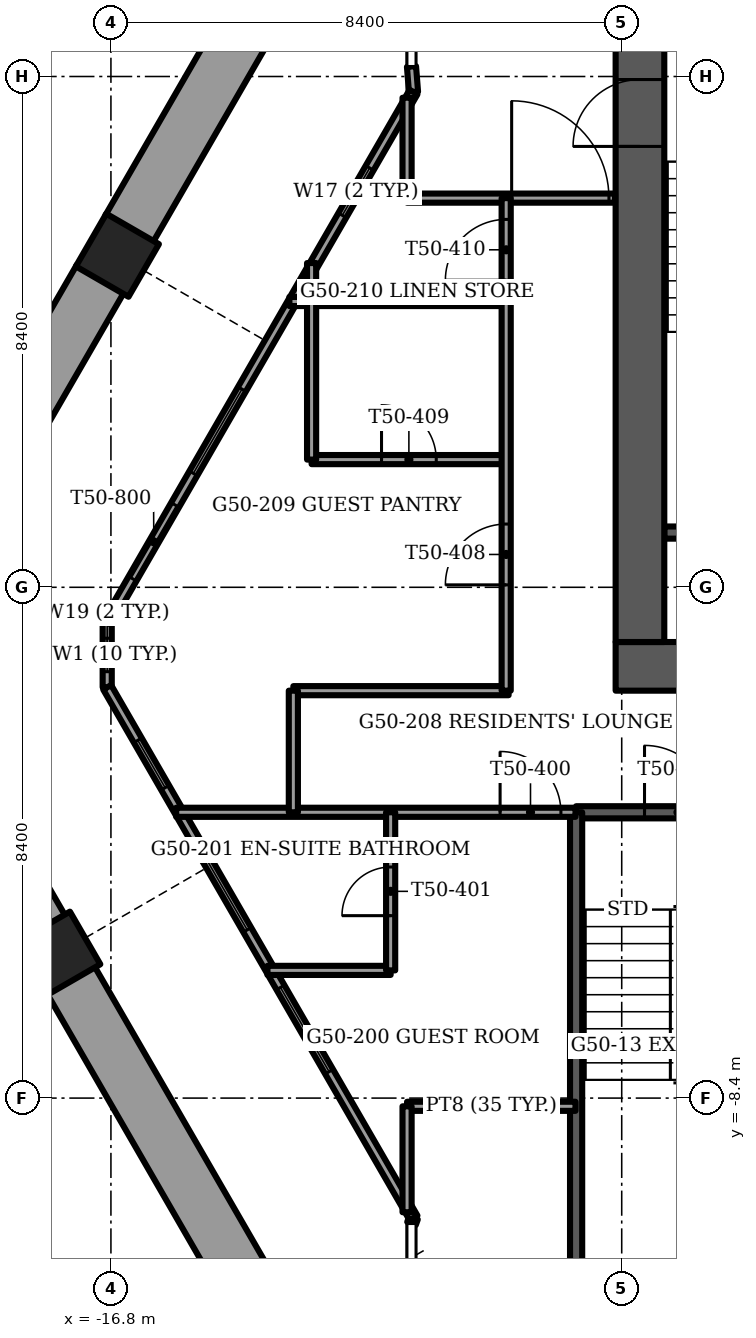
"""IFC4 building model, lengths in metres.
Left out: names, types, materials, properties, quantities, classifications, styles, units other than length and angle.
Written with IfcOpenShell. Run it as: python <this file> out.ifc"""

import sys

from ifc_helpers import new_model, si_unit, direction, frame, frame_2d, origin, origin_2d, place, context, subcontext, project, spatial, rectangle, extrude, element, fill, save


model = new_model("IFC4")
c1 = context("Model", 3, precision=1e-05, world=origin(), true_north=direction((0.0, 1.0)))
c2 = subcontext(c1, "Body", "Model", "MODEL_VIEW")
j1 = project(units=[si_unit("LENGTHUNIT", "METRE"), si_unit("PLANEANGLEUNIT", "RADIAN")], contexts=[c1])
p1 = place(None, origin())
s1 = spatial("IfcSite", under=j1, at=p1, CompositionType="ELEMENT")
p2 = place(p1, origin())
s2 = spatial("IfcBuilding", under=s1, at=p2, CompositionType="ELEMENT")
p3 = place(p2, frame((0.0, 0.0, 202.0)))
s3 = spatial("IfcBuildingStorey", under=s2, at=p3, CompositionType="ELEMENT", Elevation=202.0)
for number, where, z_axis, x_axis in (
    (1, (-16.694, 5.46, -1.2), (0.0, 0.0, 1.0), (0.5, 0.866, 0.0)),
    (2, (-17.657, -6.017, -1.2), (0.0, 0.0, 1.0), (-0.5, 0.866, 0.0)),
):
    element("IfcColumn", number, at=place(p3, frame(where, z_axis=z_axis, x_axis=x_axis)), inside=s3, PredefinedType="COLUMN", context=c2, shape_type="SweptSolid", body=[
        extrude(rectangle(XDim=1.0, YDim=1.0, at=origin_2d()), origin(), (0.0, 0.0, 1.0), 3.75),
    ])
p4 = place(p3, frame((-8.5, -1.3, -0.3), z_axis=(0.0, 0.0, 1.0), x_axis=(1.0, 0.0, 0.0)))
e3 = element("IfcWall", 3, at=p4, inside=s3, PredefinedType="SHEAR", context=c2, shape_type="SweptSolid", body=[
    extrude(rectangle(XDim=17.0, YDim=0.8, at=frame_2d((8.5, 0.0))), origin(), (0.0, 0.0, 1.0), 3.75),
])
p5 = place(p4, frame((7.7, 0.0, 0.0)))
e4 = element("IfcOpeningElement", 4, at=p5, cuts=e3, PredefinedType="OPENING", context=c2, shape_type="SweptSolid", body=[
    extrude(rectangle(XDim=1.6, YDim=2.1, at=frame_2d((0.8, 1.05))), frame((0.0, 0.4, 0.0), z_axis=(0.0, -1.0, 0.0), x_axis=(1.0, 0.0, 0.0)), (0.0, 0.0, 1.0), 0.8),
])
p6 = place(p3, frame((-8.1, -0.9, -0.3), z_axis=(0.0, 0.0, 1.0), x_axis=(0.0, 1.0, 0.0)))
e5 = element("IfcWall", 5, at=p6, inside=s3, PredefinedType="SHEAR", context=c2, shape_type="SweptSolid", body=[
    extrude(rectangle(XDim=9.8, YDim=0.8, at=frame_2d((4.9, 0.0))), origin(), (0.0, 0.0, 1.0), 3.75),
])
p7 = place(p6, frame((8.15, 0.0, 0.0)))
e6 = element("IfcOpeningElement", 6, at=p7, cuts=e5, PredefinedType="OPENING", context=c2, shape_type="SweptSolid", body=[
    extrude(rectangle(XDim=1.1, YDim=2.1, at=frame_2d((0.55, 1.05))), frame((0.0, 0.4, 0.0), z_axis=(0.0, -1.0, 0.0), x_axis=(1.0, 0.0, 0.0)), (0.0, 0.0, 1.0), 0.8),
])
p8 = place(p3, frame((-13.354, 11.345, 0.0), z_axis=(0.0, 0.0, 1.0), x_axis=(-0.500013351051, -0.866017695414, 0.0)))
e7 = element("IfcWall", 7, at=p8, inside=s3, PredefinedType="PARAPET", context=c2, shape_type="SweptSolid", body=[
    extrude(rectangle(XDim=6.296, YDim=0.9, at=frame_2d((3.148, 0.0))), origin(), (0.0, 0.0, 1.0), 1.1),
])
p9 = place(p3, frame((-16.972, 5.078, 0.0), z_axis=(0.0, 0.0, 1.0), x_axis=(-0.500010360262, -0.866019422202, 0.0)))
e8 = element("IfcWall", 8, at=p9, inside=s3, PredefinedType="PARAPET", context=c2, shape_type="SweptSolid", body=[
    extrude(rectangle(XDim=6.606, YDim=0.9, at=frame_2d((3.303, 0.0))), origin(), (0.0, 0.0, 1.0), 1.1),
])
p10 = place(p3, frame((-20.275, -1.583, 0.0), z_axis=(0.0, 0.0, 1.0), x_axis=(0.500028081597, -0.86600919026, 0.0)))
e9 = element("IfcWall", 9, at=p10, inside=s3, PredefinedType="PARAPET", context=c2, shape_type="SweptSolid", body=[
    extrude(rectangle(XDim=4.679, YDim=0.9, at=frame_2d((2.339, 0.0))), origin(), (0.0, 0.0, 1.0), 1.1),
])
p11 = place(p3, frame((-17.466, -6.449, 0.0), z_axis=(0.0, 0.0, 1.0), x_axis=(0.500013351051, -0.866017695414, 0.0)))
e10 = element("IfcWall", 10, at=p11, inside=s3, PredefinedType="PARAPET", context=c2, shape_type="SweptSolid", body=[
    extrude(rectangle(XDim=6.296, YDim=0.9, at=frame_2d((3.148, 0.0))), origin(), (0.0, 0.0, 1.0), 1.1),
])
p12 = place(p3, frame((-11.824, 8.145, 0.0), z_axis=(0.0, 0.0, 1.0), x_axis=(-0.499993749393, -0.866029012544, 0.0)))
e11 = element("IfcWall", 11, at=p12, inside=s3, PredefinedType="SOLIDWALL", context=c2, shape_type="SweptSolid", body=[
    extrude(rectangle(XDim=10.075, YDim=0.15, at=frame_2d((5.038, 0.0))), origin(), (0.0, 0.0, 1.0), 3.45),
])
p13 = place(p12, frame((1.441, 0.0, 0.15)))
e12 = element("IfcOpeningElement", 12, at=p13, cuts=e11, PredefinedType="OPENING", context=c2, shape_type="SweptSolid", body=[
    extrude(rectangle(XDim=0.9, YDim=2.2, at=frame_2d((0.45, 1.1))), frame((0.0, 0.075, 0.0), z_axis=(0.0, -1.0, 0.0), x_axis=(1.0, 0.0, 0.0)), (0.0, 0.0, 1.0), 0.15),
])
p14 = place(p12, frame((5.642, 0.0, 0.15)))
e13 = element("IfcOpeningElement", 13, at=p14, cuts=e11, PredefinedType="OPENING", context=c2, shape_type="SweptSolid", body=[
    extrude(rectangle(XDim=1.6, YDim=2.2, at=frame_2d((0.8, 1.1))), frame((0.0, 0.075, 0.0), z_axis=(0.0, -1.0, 0.0), x_axis=(1.0, 0.0, 0.0)), (0.0, 0.0, 1.0), 0.15),
])
p15 = place(p12, frame((7.842, 0.0, 0.0)))
e14 = element("IfcOpeningElement", 14, at=p15, cuts=e11, PredefinedType="OPENING", context=c2, shape_type="SweptSolid", body=[
    extrude(rectangle(XDim=1.4, YDim=2.4, at=frame_2d((0.7, 1.2))), frame((0.0, 0.075, 0.0), z_axis=(0.0, -1.0, 0.0), x_axis=(1.0, 0.0, 0.0)), (0.0, 0.0, 1.0), 0.15),
])
p16 = place(p3, frame((-16.861, -1.645, 0.0), z_axis=(0.0, 0.0, 1.0), x_axis=(0.499993749393, -0.866029012544, 0.0)))
e15 = element("IfcWall", 15, at=p16, inside=s3, PredefinedType="SOLIDWALL", context=c2, shape_type="SweptSolid", body=[
    extrude(rectangle(XDim=10.075, YDim=0.15, at=frame_2d((5.038, 0.0))), origin(), (0.0, 0.0, 1.0), 3.45),
])
p17 = place(p16, frame((1.006, 0.0, 0.15)))
e16 = element("IfcOpeningElement", 16, at=p17, cuts=e15, PredefinedType="OPENING", context=c2, shape_type="SweptSolid", body=[
    extrude(rectangle(XDim=0.9, YDim=2.2, at=frame_2d((0.45, 1.1))), frame((0.0, 0.075, 0.0), z_axis=(0.0, -1.0, 0.0), x_axis=(1.0, 0.0, 0.0)), (0.0, 0.0, 1.0), 0.15),
])
p18 = place(p16, frame((3.206, 0.0, 0.15)))
e17 = element("IfcOpeningElement", 17, at=p18, cuts=e15, PredefinedType="OPENING", context=c2, shape_type="SweptSolid", body=[
    extrude(rectangle(XDim=1.4, YDim=2.2, at=frame_2d((0.7, 1.1))), frame((0.0, 0.075, 0.0), z_axis=(0.0, -1.0, 0.0), x_axis=(1.0, 0.0, 0.0)), (0.0, 0.0, 1.0), 0.15),
])
p19 = place(p16, frame((5.699, 0.0, 0.15)))
e18 = element("IfcOpeningElement", 18, at=p19, cuts=e15, PredefinedType="OPENING", context=c2, shape_type="SweptSolid", body=[
    extrude(rectangle(XDim=1.6, YDim=2.2, at=frame_2d((0.8, 1.1))), frame((0.0, 0.075, 0.0), z_axis=(0.0, -1.0, 0.0), x_axis=(1.0, 0.0, 0.0)), (0.0, 0.0, 1.0), 0.15),
])
p20 = place(p3, frame((-16.861, -0.58, 0.0), z_axis=(0.0, 0.0, 1.0), x_axis=(0.0, -1.0, 0.0)))
e19 = element("IfcWall", 19, at=p20, inside=s3, PredefinedType="SOLIDWALL", context=c2, shape_type="SweptSolid", body=[
    extrude(rectangle(XDim=1.065, YDim=0.15, at=frame_2d((0.532, 0.0))), origin(), (0.0, 0.0, 1.0), 3.45),
])
p21 = place(p20, frame((0.258, 0.0, 0.15)))
e20 = element("IfcOpeningElement", 20, at=p21, cuts=e19, PredefinedType="OPENING", context=c2, shape_type="SweptSolid", body=[
    extrude(rectangle(XDim=0.55, YDim=2.2, at=frame_2d((0.275, 1.1))), frame((0.0, 0.075, 0.0), z_axis=(0.0, -1.0, 0.0), x_axis=(1.0, 0.0, 0.0)), (0.0, 0.0, 1.0), 0.15),
])
p22 = place(p3, frame((-11.824, 8.145, 0.0), z_axis=(0.0, 0.0, 1.0), x_axis=(-0.078869316502, 0.996884963732, 0.0)))
e21 = element("IfcWall", 21, at=p22, inside=s3, PredefinedType="SOLIDWALL", context=c2, shape_type="SweptSolid", body=[
    extrude(rectangle(XDim=0.421, YDim=0.15, at=frame_2d((0.21, 0.0))), origin(), (0.0, 0.0, 1.0), 3.45),
])
p23 = place(p3, frame((-11.824, -10.37, 0.0), z_axis=(0.0, 0.0, 1.0), x_axis=(-0.338543167143, -0.940950861619, 0.0)))
e22 = element("IfcWall", 22, at=p23, inside=s3, PredefinedType="SOLIDWALL", context=c2, shape_type="SweptSolid", body=[
    extrude(rectangle(XDim=0.098, YDim=0.15, at=frame_2d((0.049, 0.0))), origin(), (0.0, 0.0, 1.0), 3.45),
])
p24 = place(p3, frame((-7.7, 0.9, -0.3), z_axis=(0.0, 0.0, 1.0), x_axis=(1.0, 0.0, 0.0)))
e23 = element("IfcWall", 23, at=p24, inside=s3, PredefinedType="SOLIDWALL", context=c2, shape_type="SweptSolid", body=[
    extrude(rectangle(XDim=3.25, YDim=0.2, at=frame_2d((1.625, 0.0))), origin(), (0.0, 0.0, 1.0), 3.75),
])
p25 = place(p3, frame((-9.15, -3.7, -0.3), z_axis=(0.0, 0.0, 1.0), x_axis=(1.0, 0.0, 0.0)))
e24 = element("IfcWall", 24, at=p25, inside=s3, PredefinedType="SOLIDWALL", context=c2, shape_type="SweptSolid", body=[
    extrude(rectangle(XDim=3.35, YDim=0.2, at=frame_2d((1.675, 0.0))), origin(), (0.0, 0.0, 1.0), 3.75),
])
p26 = place(p25, frame((1.125, 0.0, 0.0)))
e25 = element("IfcOpeningElement", 25, at=p26, cuts=e24, PredefinedType="OPENING", context=c2, shape_type="SweptSolid", body=[
    extrude(rectangle(XDim=1.1, YDim=2.1, at=frame_2d((0.55, 1.05))), frame((0.0, 0.1, 0.0), z_axis=(0.0, -1.0, 0.0), x_axis=(1.0, 0.0, 0.0)), (0.0, 0.0, 1.0), 0.2),
])
p27 = place(p3, frame((-9.15, -3.7, -0.3), z_axis=(0.0, 0.0, 1.0), x_axis=(0.0, -1.0, 0.0)))
e26 = element("IfcWall", 26, at=p27, inside=s3, PredefinedType="SOLIDWALL", context=c2, shape_type="SweptSolid", body=[
    extrude(rectangle(XDim=7.7, YDim=0.2, at=frame_2d((3.85, 0.0))), origin(), (0.0, 0.0, 1.0), 3.75),
])
p28 = place(p3, frame((-11.93, -8.535, 0.0), z_axis=(0.0, 0.0, 1.0), x_axis=(1.0, 0.0, 0.0)))
e27 = element("IfcWall", 27, at=p28, inside=s3, PredefinedType="PARTITIONING", context=c2, shape_type="SweptSolid", body=[
    extrude(rectangle(XDim=2.77, YDim=0.15, at=frame_2d((1.385, 0.0))), origin(), (0.0, 0.0, 1.0), 3.45),
])
p29 = place(p3, frame((-14.226, -6.3, 0.0), z_axis=(0.0, 0.0, 1.0), x_axis=(1.0, 0.0, 0.0)))
e28 = element("IfcWall", 28, at=p29, inside=s3, PredefinedType="PARTITIONING", context=c2, shape_type="SweptSolid", body=[
    extrude(rectangle(XDim=2.026, YDim=0.15, at=frame_2d((1.013, 0.0))), origin(), (0.0, 0.0, 1.0), 3.45),
])
p30 = place(p3, frame((-15.727, -3.7, 0.0), z_axis=(0.0, 0.0, 1.0), x_axis=(1.0, 0.0, 0.0)))
e29 = element("IfcWall", 29, at=p30, inside=s3, PredefinedType="PARTITIONING", context=c2, shape_type="SweptSolid", body=[
    extrude(rectangle(XDim=6.567, YDim=0.15, at=frame_2d((3.284, 0.0))), origin(), (0.0, 0.0, 1.0), 3.45),
])
p31 = place(p30, frame((5.327, 0.0, 0.0)))
e30 = element("IfcOpeningElement", 30, at=p31, cuts=e29, PredefinedType="OPENING", context=c2, shape_type="SweptSolid", body=[
    extrude(rectangle(XDim=1.0, YDim=2.1, at=frame_2d((0.5, 1.05))), frame((0.0, 0.075, 0.0), z_axis=(0.0, -1.0, 0.0), x_axis=(1.0, 0.0, 0.0)), (0.0, 0.0, 1.0), 0.15),
])
p32 = place(p3, frame((-13.8, -1.7, 0.0), z_axis=(0.0, 0.0, 1.0), x_axis=(1.0, 0.0, 0.0)))
e31 = element("IfcWall", 31, at=p32, inside=s3, PredefinedType="PARTITIONING", context=c2, shape_type="SweptSolid", body=[
    extrude(rectangle(XDim=3.54, YDim=0.15, at=frame_2d((1.77, 0.0))), origin(), (0.0, 0.0, 1.0), 3.45),
])
p33 = place(p3, frame((-13.5, 2.1, 0.0), z_axis=(0.0, 0.0, 1.0), x_axis=(1.0, 0.0, 0.0)))
e32 = element("IfcWall", 32, at=p33, inside=s3, PredefinedType="PARTITIONING", context=c2, shape_type="SweptSolid", body=[
    extrude(rectangle(XDim=3.2, YDim=0.15, at=frame_2d((1.6, 0.0))), origin(), (0.0, 0.0, 1.0), 3.45),
])
p34 = place(p33, frame((1.15, 0.0, 0.0)))
e33 = element("IfcOpeningElement", 33, at=p34, cuts=e32, PredefinedType="OPENING", context=c2, shape_type="SweptSolid", body=[
    extrude(rectangle(XDim=0.9, YDim=2.1, at=frame_2d((0.45, 1.05))), frame((0.0, 0.075, 0.0), z_axis=(0.0, -1.0, 0.0), x_axis=(1.0, 0.0, 0.0)), (0.0, 0.0, 1.0), 0.15),
])
p35 = place(p3, frame((-13.865, 4.7, 0.0), z_axis=(0.0, 0.0, 1.0), x_axis=(1.0, 0.0, 0.0)))
e34 = element("IfcWall", 34, at=p35, inside=s3, PredefinedType="PARTITIONING", context=c2, shape_type="SweptSolid", body=[
    extrude(rectangle(XDim=3.565, YDim=0.15, at=frame_2d((1.782, 0.0))), origin(), (0.0, 0.0, 1.0), 3.45),
])
p36 = place(p3, frame((-11.93, 6.4, 0.0), z_axis=(0.0, 0.0, 1.0), x_axis=(1.0, 0.0, 0.0)))
e35 = element("IfcWall", 35, at=p36, inside=s3, PredefinedType="PARTITIONING", context=c2, shape_type="SweptSolid", body=[
    extrude(rectangle(XDim=3.42, YDim=0.15, at=frame_2d((1.71, 0.0))), origin(), (0.0, 0.0, 1.0), 3.45),
])
p37 = place(p36, frame((1.72, 0.0, 0.0)))
e36 = element("IfcOpeningElement", 36, at=p37, cuts=e35, PredefinedType="OPENING", context=c2, shape_type="SweptSolid", body=[
    extrude(rectangle(XDim=1.6, YDim=2.1, at=frame_2d((0.8, 1.05))), frame((0.0, 0.075, 0.0), z_axis=(0.0, -1.0, 0.0), x_axis=(1.0, 0.0, 0.0)), (0.0, 0.0, 1.0), 0.15),
])
p38 = place(p3, frame((-10.3, -1.7, 0.0), z_axis=(0.0, 0.0, 1.0), x_axis=(0.0, 1.0, 0.0)))
e37 = element("IfcWall", 37, at=p38, inside=s3, PredefinedType="PARTITIONING", context=c2, shape_type="SweptSolid", body=[
    extrude(rectangle(XDim=8.1, YDim=0.15, at=frame_2d((4.05, 0.0))), origin(), (0.0, 0.0, 1.0), 3.45),
])
p39 = place(p38, frame((1.74, 0.0, 0.0)))
e38 = element("IfcOpeningElement", 38, at=p39, cuts=e37, PredefinedType="OPENING", context=c2, shape_type="SweptSolid", body=[
    extrude(rectangle(XDim=1.0, YDim=2.1, at=frame_2d((0.5, 1.05))), frame((0.0, 0.075, 0.0), z_axis=(0.0, -1.0, 0.0), x_axis=(1.0, 0.0, 0.0)), (0.0, 0.0, 1.0), 0.15),
])
p40 = place(p38, frame((6.75, 0.0, 0.0)))
e39 = element("IfcOpeningElement", 39, at=p40, cuts=e37, PredefinedType="OPENING", context=c2, shape_type="SweptSolid", body=[
    extrude(rectangle(XDim=1.0, YDim=2.1, at=frame_2d((0.5, 1.05))), frame((0.0, 0.075, 0.0), z_axis=(0.0, -1.0, 0.0), x_axis=(1.0, 0.0, 0.0)), (0.0, 0.0, 1.0), 0.15),
])
p41 = place(p3, frame((-11.93, -10.277, 0.0), z_axis=(0.0, 0.0, 1.0), x_axis=(0.0, 1.0, 0.0)))
e40 = element("IfcWall", 40, at=p41, inside=s3, PredefinedType="PARTITIONING", context=c2, shape_type="SweptSolid", body=[
    extrude(rectangle(XDim=1.742, YDim=0.15, at=frame_2d((0.871, 0.0))), origin(), (0.0, 0.0, 1.0), 3.45),
])
p42 = place(p3, frame((-11.93, 6.4, 0.0), z_axis=(0.0, 0.0, 1.0), x_axis=(0.0, 1.0, 0.0)))
e41 = element("IfcWall", 41, at=p42, inside=s3, PredefinedType="PARTITIONING", context=c2, shape_type="SweptSolid", body=[
    extrude(rectangle(XDim=1.651, YDim=0.15, at=frame_2d((0.826, 0.0))), origin(), (0.0, 0.0, 1.0), 3.45),
])
p43 = place(p3, frame((-12.2, -6.3, 0.0), z_axis=(0.0, 0.0, 1.0), x_axis=(0.0, 1.0, 0.0)))
e42 = element("IfcWall", 42, at=p43, inside=s3, PredefinedType="PARTITIONING", context=c2, shape_type="SweptSolid", body=[
    extrude(rectangle(XDim=2.6, YDim=0.15, at=frame_2d((1.3, 0.0))), origin(), (0.0, 0.0, 1.0), 3.45),
])
p44 = place(p43, frame((0.9, 0.0, 0.0)))
e43 = element("IfcOpeningElement", 43, at=p44, cuts=e42, PredefinedType="OPENING", context=c2, shape_type="SweptSolid", body=[
    extrude(rectangle(XDim=0.8, YDim=2.1, at=frame_2d((0.4, 1.05))), frame((0.0, 0.075, 0.0), z_axis=(0.0, -1.0, 0.0), x_axis=(1.0, 0.0, 0.0)), (0.0, 0.0, 1.0), 0.15),
])
p45 = place(p3, frame((-13.5, 2.1, 0.0), z_axis=(0.0, 0.0, 1.0), x_axis=(0.0, 1.0, 0.0)))
e44 = element("IfcWall", 44, at=p45, inside=s3, PredefinedType="PARTITIONING", context=c2, shape_type="SweptSolid", body=[
    extrude(rectangle(XDim=3.232, YDim=0.15, at=frame_2d((1.616, 0.0))), origin(), (0.0, 0.0, 1.0), 3.45),
])
p46 = place(p3, frame((-13.8, -3.7, 0.0), z_axis=(0.0, 0.0, 1.0), x_axis=(0.0, 1.0, 0.0)))
e45 = element("IfcWall", 45, at=p46, inside=s3, PredefinedType="PARTITIONING", context=c2, shape_type="SweptSolid", body=[
    extrude(rectangle(XDim=2.0, YDim=0.15, at=frame_2d((1.0, 0.0))), origin(), (0.0, 0.0, 1.0), 3.45),
])
p47 = place(p13, origin())
e46 = element("IfcWindow", 46, at=p47, inside=s3, PartitioningType="SINGLE_PANEL", PredefinedType="WINDOW", context=c2, shape_type="SweptSolid", body=[
    extrude(rectangle(XDim=0.9, YDim=2.2, at=frame_2d((0.45, 1.1))), frame((0.0, 0.03, 0.0), z_axis=(0.0, -1.0, 0.0), x_axis=(1.0, 0.0, 0.0)), (0.0, 0.0, 1.0), 0.06),
])
fill(e12, e46)
p48 = place(p14, origin())
e47 = element("IfcWindow", 47, at=p48, inside=s3, PartitioningType="SINGLE_PANEL", PredefinedType="WINDOW", context=c2, shape_type="SweptSolid", body=[
    extrude(rectangle(XDim=1.6, YDim=2.2, at=frame_2d((0.8, 1.1))), frame((0.0, 0.03, 0.0), z_axis=(0.0, -1.0, 0.0), x_axis=(1.0, 0.0, 0.0)), (0.0, 0.0, 1.0), 0.06),
])
fill(e13, e47)
p49 = place(p15, origin())
e48 = element("IfcDoor", 48, at=p49, inside=s3, OperationType="SLIDING_TO_RIGHT", PredefinedType="DOOR", context=c2, shape_type="SweptSolid", body=[
    extrude(rectangle(XDim=1.4, YDim=2.4, at=frame_2d((0.7, 1.2))), frame((0.0, 0.025, 0.0), z_axis=(0.0, -1.0, 0.0), x_axis=(1.0, 0.0, 0.0)), (0.0, 0.0, 1.0), 0.05),
])
fill(e14, e48)
p50 = place(p17, origin())
e49 = element("IfcWindow", 49, at=p50, inside=s3, PartitioningType="SINGLE_PANEL", PredefinedType="WINDOW", context=c2, shape_type="SweptSolid", body=[
    extrude(rectangle(XDim=0.9, YDim=2.2, at=frame_2d((0.45, 1.1))), frame((0.0, 0.03, 0.0), z_axis=(0.0, -1.0, 0.0), x_axis=(1.0, 0.0, 0.0)), (0.0, 0.0, 1.0), 0.06),
])
fill(e16, e49)
p51 = place(p18, origin())
e50 = element("IfcWindow", 50, at=p51, inside=s3, PartitioningType="SINGLE_PANEL", PredefinedType="WINDOW", context=c2, shape_type="SweptSolid", body=[
    extrude(rectangle(XDim=1.4, YDim=2.2, at=frame_2d((0.7, 1.1))), frame((0.0, 0.03, 0.0), z_axis=(0.0, -1.0, 0.0), x_axis=(1.0, 0.0, 0.0)), (0.0, 0.0, 1.0), 0.06),
])
fill(e17, e50)
p52 = place(p19, origin())
e51 = element("IfcWindow", 51, at=p52, inside=s3, PartitioningType="SINGLE_PANEL", PredefinedType="WINDOW", context=c2, shape_type="SweptSolid", body=[
    extrude(rectangle(XDim=1.6, YDim=2.2, at=frame_2d((0.8, 1.1))), frame((0.0, 0.03, 0.0), z_axis=(0.0, -1.0, 0.0), x_axis=(1.0, 0.0, 0.0)), (0.0, 0.0, 1.0), 0.06),
])
fill(e18, e51)
p53 = place(p21, origin())
e52 = element("IfcWindow", 52, at=p53, inside=s3, PartitioningType="SINGLE_PANEL", PredefinedType="WINDOW", context=c2, shape_type="SweptSolid", body=[
    extrude(rectangle(XDim=0.55, YDim=2.2, at=frame_2d((0.275, 1.1))), frame((0.0, 0.03, 0.0), z_axis=(0.0, -1.0, 0.0), x_axis=(1.0, 0.0, 0.0)), (0.0, 0.0, 1.0), 0.06),
])
fill(e20, e52)
p54 = place(p7, origin())
e53 = element("IfcDoor", 53, at=p54, inside=s3, OperationType="SINGLE_SWING_RIGHT", PredefinedType="DOOR", context=c2, shape_type="SweptSolid", body=[
    extrude(rectangle(XDim=1.1, YDim=2.1, at=frame_2d((0.55, 1.05))), frame((0.0, 0.025, 0.0), z_axis=(0.0, -1.0, 0.0), x_axis=(1.0, 0.0, 0.0)), (0.0, 0.0, 1.0), 0.05),
])
fill(e6, e53)
p55 = place(p26, origin())
e54 = element("IfcDoor", 54, at=p55, inside=s3, OperationType="SINGLE_SWING_LEFT", PredefinedType="DOOR", context=c2, shape_type="SweptSolid", body=[
    extrude(rectangle(XDim=1.1, YDim=2.1, at=frame_2d((0.55, 1.05))), frame((0.0, 0.025, 0.0), z_axis=(0.0, -1.0, 0.0), x_axis=(1.0, 0.0, 0.0)), (0.0, 0.0, 1.0), 0.05),
])
fill(e25, e54)
p56 = place(p31, origin())
e55 = element("IfcDoor", 55, at=p56, inside=s3, OperationType="SINGLE_SWING_RIGHT", PredefinedType="DOOR", context=c2, shape_type="SweptSolid", body=[
    extrude(rectangle(XDim=1.0, YDim=2.1, at=frame_2d((0.5, 1.05))), frame((0.0, 0.025, 0.0), z_axis=(0.0, -1.0, 0.0), x_axis=(1.0, 0.0, 0.0)), (0.0, 0.0, 1.0), 0.05),
])
fill(e30, e55)
p57 = place(p44, origin())
e56 = element("IfcDoor", 56, at=p57, inside=s3, OperationType="SINGLE_SWING_RIGHT", PredefinedType="DOOR", context=c2, shape_type="SweptSolid", body=[
    extrude(rectangle(XDim=0.8, YDim=2.1, at=frame_2d((0.4, 1.05))), frame((0.0, 0.025, 0.0), z_axis=(0.0, -1.0, 0.0), x_axis=(1.0, 0.0, 0.0)), (0.0, 0.0, 1.0), 0.05),
])
fill(e43, e56)
p58 = place(p39, origin())
e57 = element("IfcDoor", 57, at=p58, inside=s3, OperationType="SINGLE_SWING_LEFT", PredefinedType="DOOR", context=c2, shape_type="SweptSolid", body=[
    extrude(rectangle(XDim=1.0, YDim=2.1, at=frame_2d((0.5, 1.05))), frame((0.0, 0.025, 0.0), z_axis=(0.0, -1.0, 0.0), x_axis=(1.0, 0.0, 0.0)), (0.0, 0.0, 1.0), 0.05),
])
fill(e38, e57)
p59 = place(p34, origin())
e58 = element("IfcDoor", 58, at=p59, inside=s3, OperationType="SINGLE_SWING_RIGHT", PredefinedType="DOOR", context=c2, shape_type="SweptSolid", body=[
    extrude(rectangle(XDim=0.9, YDim=2.1, at=frame_2d((0.45, 1.05))), frame((0.0, 0.025, 0.0), z_axis=(0.0, -1.0, 0.0), x_axis=(1.0, 0.0, 0.0)), (0.0, 0.0, 1.0), 0.05),
])
fill(e33, e58)
p60 = place(p40, origin())
e59 = element("IfcDoor", 59, at=p60, inside=s3, OperationType="SINGLE_SWING_LEFT", PredefinedType="DOOR", context=c2, shape_type="SweptSolid", body=[
    extrude(rectangle(XDim=1.0, YDim=2.1, at=frame_2d((0.5, 1.05))), frame((0.0, 0.025, 0.0), z_axis=(0.0, -1.0, 0.0), x_axis=(1.0, 0.0, 0.0)), (0.0, 0.0, 1.0), 0.05),
])
fill(e39, e59)
p61 = place(p37, origin())
e60 = element("IfcDoor", 60, at=p61, inside=s3, OperationType="DOUBLE_DOOR_SINGLE_SWING", PredefinedType="DOOR", context=c2, shape_type="SweptSolid", body=[
    extrude(rectangle(XDim=1.6, YDim=2.1, at=frame_2d((0.8, 1.05))), frame((0.0, 0.025, 0.0), z_axis=(0.0, -1.0, 0.0), x_axis=(1.0, 0.0, 0.0)), (0.0, 0.0, 1.0), 0.05),
])
fill(e36, e60)
save(model, sys.argv[1])
